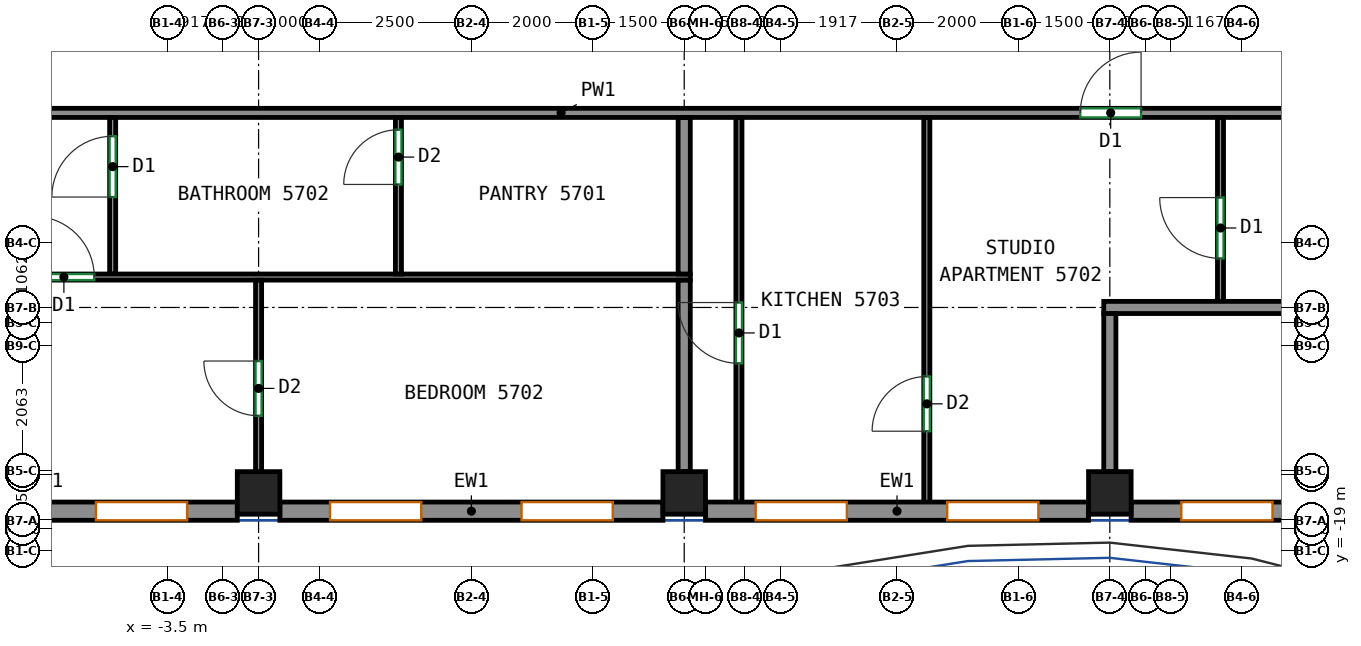
"""IFC4 building model, lengths in metres.
Left out: names, types, materials, properties, quantities, classifications, styles, units other than length and angle.
Written with IfcOpenShell. Run it as: python <this file> out.ifc"""

import sys

from ifc_helpers import new_model, si_unit, direction, frame, frame_2d, origin, origin_2d, place, context, subcontext, project, spatial, rectangle, extrude, source, transform, mapped, element, fill, save


model = new_model("IFC4")
c1 = context("Model", 3, precision=1e-05, world=origin(), true_north=direction((0.0, 1.0)))
c2 = subcontext(c1, "Body", "Model", "MODEL_VIEW")
j1 = project(units=[si_unit("LENGTHUNIT", "METRE"), si_unit("PLANEANGLEUNIT", "RADIAN")], contexts=[c1])
p1 = place(None, origin())
s1 = spatial("IfcSite", under=j1, at=p1, CompositionType="ELEMENT")
p2 = place(p1, origin())
s2 = spatial("IfcBuilding", under=s1, at=p2, CompositionType="ELEMENT")
p3 = place(p2, frame((0.0, 0.0, 239.0)))
s3 = spatial("IfcBuildingStorey", under=s2, at=p3, CompositionType="ELEMENT", Elevation=239.0)
m1 = source(origin(), c2, "Body", "SweptSolid", [
    extrude(rectangle(XDim=0.7, YDim=0.7, at=origin_2d()), origin(), (0.0, 0.0, 1.0), 3.12),
])
for number, where, z_axis, x_axis in (
    (1, (-2.0, -18.05, 0.0), (0.0, 0.0, 1.0), (1.0, 0.0, 0.0)),
    (2, (5.0, -18.05, 0.0), (0.0, 0.0, 1.0), (1.0, 0.0, 0.0)),
    (3, (12.0, -18.05, 0.0), (0.0, 0.0, 1.0), (1.0, 0.0, 0.0)),
):
    element("IfcColumn", number, at=place(p3, frame(where, z_axis=z_axis, x_axis=x_axis)), inside=s3, PredefinedType="COLUMN", context=c2, shape_type="MappedRepresentation", body=[
        mapped(m1, transform((0.0, 0.0, 0.0))),
    ])
m2 = source(origin(), c2, "Body", "SweptSolid", [
    extrude(rectangle(XDim=6.3, YDim=0.3, at=frame_2d((3.15, 0.0))), origin(), (0.0, 0.0, 1.0), 3.12),
])
p4 = place(p3, frame((-8.65, -18.35, 0.0), z_axis=(0.0, 0.0, 1.0), x_axis=(1.0, 0.0, 0.0)))
e4 = element("IfcWall", 4, at=p4, inside=s3, PredefinedType="SOLIDWALL", context=c2, shape_type="MappedRepresentation", body=[
    mapped(m2, transform((0.0, 0.0, 0.0))),
])
p5 = place(p4, frame((0.825, 0.0, 0.8)))
e5 = element("IfcOpeningElement", 5, at=p5, cuts=e4, PredefinedType="OPENING", context=c2, shape_type="SweptSolid", body=[
    extrude(rectangle(XDim=1.5, YDim=2.05, at=frame_2d((0.75, 1.025))), frame((0.0, 0.16, 0.0), z_axis=(0.0, -1.0, 0.0), x_axis=(1.0, 0.0, 0.0)), (0.0, 0.0, 1.0), 0.32),
])
p6 = place(p4, frame((3.975, 0.0, 0.8)))
e6 = element("IfcOpeningElement", 6, at=p6, cuts=e4, PredefinedType="OPENING", context=c2, shape_type="SweptSolid", body=[
    extrude(rectangle(XDim=1.5, YDim=2.05, at=frame_2d((0.75, 1.025))), frame((0.0, 0.16, 0.0), z_axis=(0.0, -1.0, 0.0), x_axis=(1.0, 0.0, 0.0)), (0.0, 0.0, 1.0), 0.32),
])
p7 = place(p3, frame((-1.65, -18.35, 0.0), z_axis=(0.0, 0.0, 1.0), x_axis=(1.0, 0.0, 0.0)))
e7 = element("IfcWall", 7, at=p7, inside=s3, PredefinedType="SOLIDWALL", context=c2, shape_type="MappedRepresentation", body=[
    mapped(m2, transform((0.0, 0.0, 0.0))),
])
p8 = place(p7, frame((0.825, 0.0, 0.8)))
e8 = element("IfcOpeningElement", 8, at=p8, cuts=e7, PredefinedType="OPENING", context=c2, shape_type="SweptSolid", body=[
    extrude(rectangle(XDim=1.5, YDim=2.05, at=frame_2d((0.75, 1.025))), frame((0.0, 0.16, 0.0), z_axis=(0.0, -1.0, 0.0), x_axis=(1.0, 0.0, 0.0)), (0.0, 0.0, 1.0), 0.32),
])
p9 = place(p7, frame((3.975, 0.0, 0.8)))
e9 = element("IfcOpeningElement", 9, at=p9, cuts=e7, PredefinedType="OPENING", context=c2, shape_type="SweptSolid", body=[
    extrude(rectangle(XDim=1.5, YDim=2.05, at=frame_2d((0.75, 1.025))), frame((0.0, 0.16, 0.0), z_axis=(0.0, -1.0, 0.0), x_axis=(1.0, 0.0, 0.0)), (0.0, 0.0, 1.0), 0.32),
])
p10 = place(p3, frame((5.35, -18.35, 0.0), z_axis=(0.0, 0.0, 1.0), x_axis=(1.0, 0.0, 0.0)))
e10 = element("IfcWall", 10, at=p10, inside=s3, PredefinedType="SOLIDWALL", context=c2, shape_type="MappedRepresentation", body=[
    mapped(m2, transform((0.0, 0.0, 0.0))),
])
p11 = place(p10, frame((0.825, 0.0, 0.8)))
e11 = element("IfcOpeningElement", 11, at=p11, cuts=e10, PredefinedType="OPENING", context=c2, shape_type="SweptSolid", body=[
    extrude(rectangle(XDim=1.5, YDim=2.05, at=frame_2d((0.75, 1.025))), frame((0.0, 0.16, 0.0), z_axis=(0.0, -1.0, 0.0), x_axis=(1.0, 0.0, 0.0)), (0.0, 0.0, 1.0), 0.32),
])
p12 = place(p10, frame((3.975, 0.0, 0.8)))
e12 = element("IfcOpeningElement", 12, at=p12, cuts=e10, PredefinedType="OPENING", context=c2, shape_type="SweptSolid", body=[
    extrude(rectangle(XDim=1.5, YDim=2.05, at=frame_2d((0.75, 1.025))), frame((0.0, 0.16, 0.0), z_axis=(0.0, -1.0, 0.0), x_axis=(1.0, 0.0, 0.0)), (0.0, 0.0, 1.0), 0.32),
])
p13 = place(p3, frame((12.35, -18.35, 0.0), z_axis=(0.0, 0.0, 1.0), x_axis=(1.0, 0.0, 0.0)))
e13 = element("IfcWall", 13, at=p13, inside=s3, PredefinedType="SOLIDWALL", context=c2, shape_type="MappedRepresentation", body=[
    mapped(m2, transform((0.0, 0.0, 0.0))),
])
p14 = place(p13, frame((0.825, 0.0, 0.8)))
e14 = element("IfcOpeningElement", 14, at=p14, cuts=e13, PredefinedType="OPENING", context=c2, shape_type="SweptSolid", body=[
    extrude(rectangle(XDim=1.5, YDim=2.05, at=frame_2d((0.75, 1.025))), frame((0.0, 0.16, 0.0), z_axis=(0.0, -1.0, 0.0), x_axis=(1.0, 0.0, 0.0)), (0.0, 0.0, 1.0), 0.32),
])
p15 = place(p13, frame((3.975, 0.0, 0.8)))
e15 = element("IfcOpeningElement", 15, at=p15, cuts=e13, PredefinedType="OPENING", context=c2, shape_type="SweptSolid", body=[
    extrude(rectangle(XDim=1.5, YDim=2.05, at=frame_2d((0.75, 1.025))), frame((0.0, 0.16, 0.0), z_axis=(0.0, -1.0, 0.0), x_axis=(1.0, 0.0, 0.0)), (0.0, 0.0, 1.0), 0.32),
])
p16 = place(p3, frame((-11.8, -11.8, 0.0), z_axis=(0.0, 0.0, 1.0), x_axis=(1.0, 0.0, 0.0)))
e16 = element("IfcWall", 16, at=p16, inside=s3, PredefinedType="PARTITIONING", context=c2, shape_type="SweptSolid", body=[
    extrude(rectangle(XDim=29.55, YDim=0.15, at=frame_2d((14.775, 0.0))), origin(), (0.0, 0.0, 1.0), 3.12),
])
p17 = place(p16, frame((4.802, 0.0, 0.0)))
e17 = element("IfcOpeningElement", 17, at=p17, cuts=e16, PredefinedType="OPENING", context=c2, shape_type="SweptSolid", body=[
    extrude(rectangle(XDim=1.0, YDim=2.1, at=frame_2d((0.5, 1.05))), frame((0.0, 0.085, 0.0), z_axis=(0.0, -1.0, 0.0), x_axis=(1.0, 0.0, 0.0)), (0.0, 0.0, 1.0), 0.17),
])
p18 = place(p16, frame((23.314, 0.0, 0.0)))
e18 = element("IfcOpeningElement", 18, at=p18, cuts=e16, PredefinedType="OPENING", context=c2, shape_type="SweptSolid", body=[
    extrude(rectangle(XDim=1.0, YDim=2.1, at=frame_2d((0.5, 1.05))), frame((0.0, 0.085, 0.0), z_axis=(0.0, -1.0, 0.0), x_axis=(1.0, 0.0, 0.0)), (0.0, 0.0, 1.0), 0.17),
])
p19 = place(p3, frame((-4.4, -14.45, 0.0), z_axis=(0.0, 0.0, 1.0), x_axis=(0.0, 1.0, 0.0)))
e19 = element("IfcWall", 19, at=p19, inside=s3, PredefinedType="PARTITIONING", context=c2, shape_type="SweptSolid", body=[
    extrude(rectangle(XDim=2.573, YDim=0.1, at=frame_2d((1.287, 0.0))), origin(), (0.0, 0.0, 1.0), 3.12),
])
p20 = place(p19, frame((1.266, 0.0, 0.0)))
e20 = element("IfcOpeningElement", 20, at=p20, cuts=e19, PredefinedType="OPENING", context=c2, shape_type="SweptSolid", body=[
    extrude(rectangle(XDim=1.0, YDim=2.1, at=frame_2d((0.5, 1.05))), frame((0.0, 0.06, 0.0), z_axis=(0.0, -1.0, 0.0), x_axis=(1.0, 0.0, 0.0)), (0.0, 0.0, 1.0), 0.12),
])
p21 = place(p3, frame((-9.15, -14.5, 0.0), z_axis=(0.0, 0.0, 1.0), x_axis=(1.0, 0.0, 0.0)))
e21 = element("IfcWall", 21, at=p21, inside=s3, PredefinedType="PARTITIONING", context=c2, shape_type="SweptSolid", body=[
    extrude(rectangle(XDim=14.25, YDim=0.1, at=frame_2d((7.125, 0.0))), origin(), (0.0, 0.0, 1.0), 3.12),
])
p22 = place(p21, frame((3.448, 0.0, 0.0)))
e22 = element("IfcOpeningElement", 22, at=p22, cuts=e21, PredefinedType="OPENING", context=c2, shape_type="SweptSolid", body=[
    extrude(rectangle(XDim=1.0, YDim=2.1, at=frame_2d((0.5, 1.05))), frame((0.0, 0.06, 0.0), z_axis=(0.0, -1.0, 0.0), x_axis=(1.0, 0.0, 0.0)), (0.0, 0.0, 1.0), 0.12),
])
p23 = place(p3, frame((0.3, -14.45, 0.0), z_axis=(0.0, 0.0, 1.0), x_axis=(0.0, 1.0, 0.0)))
e23 = element("IfcWall", 23, at=p23, inside=s3, PredefinedType="PARTITIONING", context=c2, shape_type="SweptSolid", body=[
    extrude(rectangle(XDim=2.573, YDim=0.1, at=frame_2d((1.287, 0.0))), origin(), (0.0, 0.0, 1.0), 3.12),
])
p24 = place(p23, frame((1.473, 0.0, 0.0)))
e24 = element("IfcOpeningElement", 24, at=p24, cuts=e23, PredefinedType="OPENING", context=c2, shape_type="SweptSolid", body=[
    extrude(rectangle(XDim=0.9, YDim=2.1, at=frame_2d((0.45, 1.05))), frame((0.0, 0.06, 0.0), z_axis=(0.0, -1.0, 0.0), x_axis=(1.0, 0.0, 0.0)), (0.0, 0.0, 1.0), 0.12),
])
p25 = place(p3, frame((5.0, -14.45, 0.0), z_axis=(0.0, 0.0, 1.0), x_axis=(0.0, 1.0, 0.0)))
e25 = element("IfcWall", 25, at=p25, inside=s3, PredefinedType="PARTITIONING", context=c2, shape_type="SweptSolid", body=[
    extrude(rectangle(XDim=2.573, YDim=0.2, at=frame_2d((1.287, 0.0))), origin(), (0.0, 0.0, 1.0), 3.12),
])
p26 = place(p3, frame((-2.0, -17.7, 0.0), z_axis=(0.0, 0.0, 1.0), x_axis=(0.0, 1.0, 0.0)))
e26 = element("IfcWall", 26, at=p26, inside=s3, PredefinedType="PARTITIONING", context=c2, shape_type="SweptSolid", body=[
    extrude(rectangle(XDim=3.148, YDim=0.1, at=frame_2d((1.574, 0.0))), origin(), (0.0, 0.0, 1.0), 3.12),
])
p27 = place(p26, frame((0.919, 0.0, 0.0)))
e27 = element("IfcOpeningElement", 27, at=p27, cuts=e26, PredefinedType="OPENING", context=c2, shape_type="SweptSolid", body=[
    extrude(rectangle(XDim=0.9, YDim=2.1, at=frame_2d((0.45, 1.05))), frame((0.0, 0.06, 0.0), z_axis=(0.0, -1.0, 0.0), x_axis=(1.0, 0.0, 0.0)), (0.0, 0.0, 1.0), 0.12),
])
p28 = place(p3, frame((5.0, -17.7, 0.0), z_axis=(0.0, 0.0, 1.0), x_axis=(0.0, 1.0, 0.0)))
e28 = element("IfcWall", 28, at=p28, inside=s3, PredefinedType="PARTITIONING", context=c2, shape_type="SweptSolid", body=[
    extrude(rectangle(XDim=3.148, YDim=0.2, at=frame_2d((1.574, 0.0))), origin(), (0.0, 0.0, 1.0), 3.12),
])
p29 = place(p3, frame((5.9, -18.25, 0.0), z_axis=(0.0, 0.0, 1.0), x_axis=(0.0, 1.0, 0.0)))
e29 = element("IfcWall", 29, at=p29, inside=s3, PredefinedType="PARTITIONING", context=c2, shape_type="SweptSolid", body=[
    extrude(rectangle(XDim=6.373, YDim=0.1, at=frame_2d((3.187, 0.0))), origin(), (0.0, 0.0, 1.0), 3.12),
])
p30 = place(p29, frame((2.331, 0.0, 0.0)))
e30 = element("IfcOpeningElement", 30, at=p30, cuts=e29, PredefinedType="OPENING", context=c2, shape_type="SweptSolid", body=[
    extrude(rectangle(XDim=1.0, YDim=2.1, at=frame_2d((0.5, 1.05))), frame((0.0, 0.06, 0.0), z_axis=(0.0, -1.0, 0.0), x_axis=(1.0, 0.0, 0.0)), (0.0, 0.0, 1.0), 0.12),
])
p31 = place(p3, frame((8.99, -18.25, 0.0), z_axis=(0.0, 0.0, 1.0), x_axis=(0.0, 1.0, 0.0)))
e31 = element("IfcWall", 31, at=p31, inside=s3, PredefinedType="PARTITIONING", context=c2, shape_type="SweptSolid", body=[
    extrude(rectangle(XDim=6.373, YDim=0.1, at=frame_2d((3.187, 0.0))), origin(), (0.0, 0.0, 1.0), 3.12),
])
p32 = place(p31, frame((1.215, 0.0, 0.0)))
e32 = element("IfcOpeningElement", 32, at=p32, cuts=e31, PredefinedType="OPENING", context=c2, shape_type="SweptSolid", body=[
    extrude(rectangle(XDim=0.9, YDim=2.1, at=frame_2d((0.45, 1.05))), frame((0.0, 0.06, 0.0), z_axis=(0.0, -1.0, 0.0), x_axis=(1.0, 0.0, 0.0)), (0.0, 0.0, 1.0), 0.12),
])
p33 = place(p3, frame((13.82, -14.9, 0.0), z_axis=(0.0, 0.0, 1.0), x_axis=(0.0, 1.0, 0.0)))
e33 = element("IfcWall", 33, at=p33, inside=s3, PredefinedType="PARTITIONING", context=c2, shape_type="SweptSolid", body=[
    extrude(rectangle(XDim=3.023, YDim=0.1, at=frame_2d((1.511, 0.0))), origin(), (0.0, 0.0, 1.0), 3.12),
])
p34 = place(p33, frame((0.707, 0.0, 0.0)))
e34 = element("IfcOpeningElement", 34, at=p34, cuts=e33, PredefinedType="OPENING", context=c2, shape_type="SweptSolid", body=[
    extrude(rectangle(XDim=1.0, YDim=2.1, at=frame_2d((0.5, 1.05))), frame((0.0, 0.06, 0.0), z_axis=(0.0, -1.0, 0.0), x_axis=(1.0, 0.0, 0.0)), (0.0, 0.0, 1.0), 0.12),
])
p35 = place(p3, frame((11.9, -15.0, 0.0), z_axis=(0.0, 0.0, 1.0), x_axis=(1.0, 0.0, 0.0)))
e35 = element("IfcWall", 35, at=p35, inside=s3, PredefinedType="PARTITIONING", context=c2, shape_type="SweptSolid", body=[
    extrude(rectangle(XDim=3.7, YDim=0.2, at=frame_2d((1.85, 0.0))), origin(), (0.0, 0.0, 1.0), 3.12),
])
p36 = place(p3, frame((12.0, -17.7, 0.0), z_axis=(0.0, 0.0, 1.0), x_axis=(0.0, 1.0, 0.0)))
e36 = element("IfcWall", 36, at=p36, inside=s3, PredefinedType="PARTITIONING", context=c2, shape_type="SweptSolid", body=[
    extrude(rectangle(XDim=2.6, YDim=0.2, at=frame_2d((1.3, 0.0))), origin(), (0.0, 0.0, 1.0), 3.12),
])
p37 = place(p6, origin())
e37 = element("IfcWindow", 37, at=p37, inside=s3, PartitioningType="SINGLE_PANEL", PredefinedType="WINDOW", context=c2, shape_type="SweptSolid", body=[
    extrude(rectangle(XDim=1.5, YDim=2.05, at=frame_2d((0.75, 1.025))), frame((0.0, 0.03, 0.0), z_axis=(0.0, -1.0, 0.0), x_axis=(1.0, 0.0, 0.0)), (0.0, 0.0, 1.0), 0.06),
])
fill(e6, e37)
p38 = place(p8, origin())
e38 = element("IfcWindow", 38, at=p38, inside=s3, PartitioningType="SINGLE_PANEL", PredefinedType="WINDOW", context=c2, shape_type="SweptSolid", body=[
    extrude(rectangle(XDim=1.5, YDim=2.05, at=frame_2d((0.75, 1.025))), frame((0.0, 0.03, 0.0), z_axis=(0.0, -1.0, 0.0), x_axis=(1.0, 0.0, 0.0)), (0.0, 0.0, 1.0), 0.06),
])
fill(e8, e38)
p39 = place(p9, origin())
e39 = element("IfcWindow", 39, at=p39, inside=s3, PartitioningType="SINGLE_PANEL", PredefinedType="WINDOW", context=c2, shape_type="SweptSolid", body=[
    extrude(rectangle(XDim=1.5, YDim=2.05, at=frame_2d((0.75, 1.025))), frame((0.0, 0.03, 0.0), z_axis=(0.0, -1.0, 0.0), x_axis=(1.0, 0.0, 0.0)), (0.0, 0.0, 1.0), 0.06),
])
fill(e9, e39)
p40 = place(p11, origin())
e40 = element("IfcWindow", 40, at=p40, inside=s3, PartitioningType="SINGLE_PANEL", PredefinedType="WINDOW", context=c2, shape_type="SweptSolid", body=[
    extrude(rectangle(XDim=1.5, YDim=2.05, at=frame_2d((0.75, 1.025))), frame((0.0, 0.03, 0.0), z_axis=(0.0, -1.0, 0.0), x_axis=(1.0, 0.0, 0.0)), (0.0, 0.0, 1.0), 0.06),
])
fill(e11, e40)
p41 = place(p12, origin())
e41 = element("IfcWindow", 41, at=p41, inside=s3, PartitioningType="SINGLE_PANEL", PredefinedType="WINDOW", context=c2, shape_type="SweptSolid", body=[
    extrude(rectangle(XDim=1.5, YDim=2.05, at=frame_2d((0.75, 1.025))), frame((0.0, 0.03, 0.0), z_axis=(0.0, -1.0, 0.0), x_axis=(1.0, 0.0, 0.0)), (0.0, 0.0, 1.0), 0.06),
])
fill(e12, e41)
p42 = place(p14, origin())
e42 = element("IfcWindow", 42, at=p42, inside=s3, PartitioningType="SINGLE_PANEL", PredefinedType="WINDOW", context=c2, shape_type="SweptSolid", body=[
    extrude(rectangle(XDim=1.5, YDim=2.05, at=frame_2d((0.75, 1.025))), frame((0.0, 0.03, 0.0), z_axis=(0.0, -1.0, 0.0), x_axis=(1.0, 0.0, 0.0)), (0.0, 0.0, 1.0), 0.06),
])
fill(e14, e42)
p43 = place(p32, origin())
e43 = element("IfcDoor", 43, at=p43, inside=s3, OperationType="SINGLE_SWING_LEFT", PredefinedType="DOOR", context=c2, shape_type="SweptSolid", body=[
    extrude(rectangle(XDim=0.9, YDim=2.1, at=frame_2d((0.45, 1.05))), frame((0.0, 0.025, 0.0), z_axis=(0.0, -1.0, 0.0), x_axis=(1.0, 0.0, 0.0)), (0.0, 0.0, 1.0), 0.05),
])
fill(e32, e43)
p44 = place(p27, origin())
e44 = element("IfcDoor", 44, at=p44, inside=s3, OperationType="SINGLE_SWING_RIGHT", PredefinedType="DOOR", context=c2, shape_type="SweptSolid", body=[
    extrude(rectangle(XDim=0.9, YDim=2.1, at=frame_2d((0.45, 1.05))), frame((0.0, 0.025, 0.0), z_axis=(0.0, -1.0, 0.0), x_axis=(1.0, 0.0, 0.0)), (0.0, 0.0, 1.0), 0.05),
])
fill(e27, e44)
p45 = place(p30, origin())
e45 = element("IfcDoor", 45, at=p45, inside=s3, OperationType="SINGLE_SWING_RIGHT", PredefinedType="DOOR", context=c2, shape_type="SweptSolid", body=[
    extrude(rectangle(XDim=1.0, YDim=2.1, at=frame_2d((0.5, 1.05))), frame((0.0, 0.025, 0.0), z_axis=(0.0, -1.0, 0.0), x_axis=(1.0, 0.0, 0.0)), (0.0, 0.0, 1.0), 0.05),
])
fill(e30, e45)
p46 = place(p22, origin())
e46 = element("IfcDoor", 46, at=p46, inside=s3, OperationType="SINGLE_SWING_LEFT", PredefinedType="DOOR", context=c2, shape_type="SweptSolid", body=[
    extrude(rectangle(XDim=1.0, YDim=2.1, at=frame_2d((0.5, 1.05))), frame((0.0, 0.025, 0.0), z_axis=(0.0, -1.0, 0.0), x_axis=(1.0, 0.0, 0.0)), (0.0, 0.0, 1.0), 0.05),
])
fill(e22, e46)
p47 = place(p34, origin())
e47 = element("IfcDoor", 47, at=p47, inside=s3, OperationType="SINGLE_SWING_RIGHT", PredefinedType="DOOR", context=c2, shape_type="SweptSolid", body=[
    extrude(rectangle(XDim=1.0, YDim=2.1, at=frame_2d((0.5, 1.05))), frame((0.0, 0.025, 0.0), z_axis=(0.0, -1.0, 0.0), x_axis=(1.0, 0.0, 0.0)), (0.0, 0.0, 1.0), 0.05),
])
fill(e34, e47)
p48 = place(p20, origin())
e48 = element("IfcDoor", 48, at=p48, inside=s3, OperationType="SINGLE_SWING_LEFT", PredefinedType="DOOR", context=c2, shape_type="SweptSolid", body=[
    extrude(rectangle(XDim=1.0, YDim=2.1, at=frame_2d((0.5, 1.05))), frame((0.0, 0.025, 0.0), z_axis=(0.0, -1.0, 0.0), x_axis=(1.0, 0.0, 0.0)), (0.0, 0.0, 1.0), 0.05),
])
fill(e20, e48)
p49 = place(p24, origin())
e49 = element("IfcDoor", 49, at=p49, inside=s3, OperationType="SINGLE_SWING_LEFT", PredefinedType="DOOR", context=c2, shape_type="SweptSolid", body=[
    extrude(rectangle(XDim=0.9, YDim=2.1, at=frame_2d((0.45, 1.05))), frame((0.0, 0.025, 0.0), z_axis=(0.0, -1.0, 0.0), x_axis=(1.0, 0.0, 0.0)), (0.0, 0.0, 1.0), 0.05),
])
fill(e24, e49)
p50 = place(p18, origin())
e50 = element("IfcDoor", 50, at=p50, inside=s3, OperationType="SINGLE_SWING_RIGHT", PredefinedType="DOOR", context=c2, shape_type="SweptSolid", body=[
    extrude(rectangle(XDim=1.0, YDim=2.1, at=frame_2d((0.5, 1.05))), frame((0.0, 0.025, 0.0), z_axis=(0.0, -1.0, 0.0), x_axis=(1.0, 0.0, 0.0)), (0.0, 0.0, 1.0), 0.05),
])
fill(e18, e50)
save(model, sys.argv[1])
